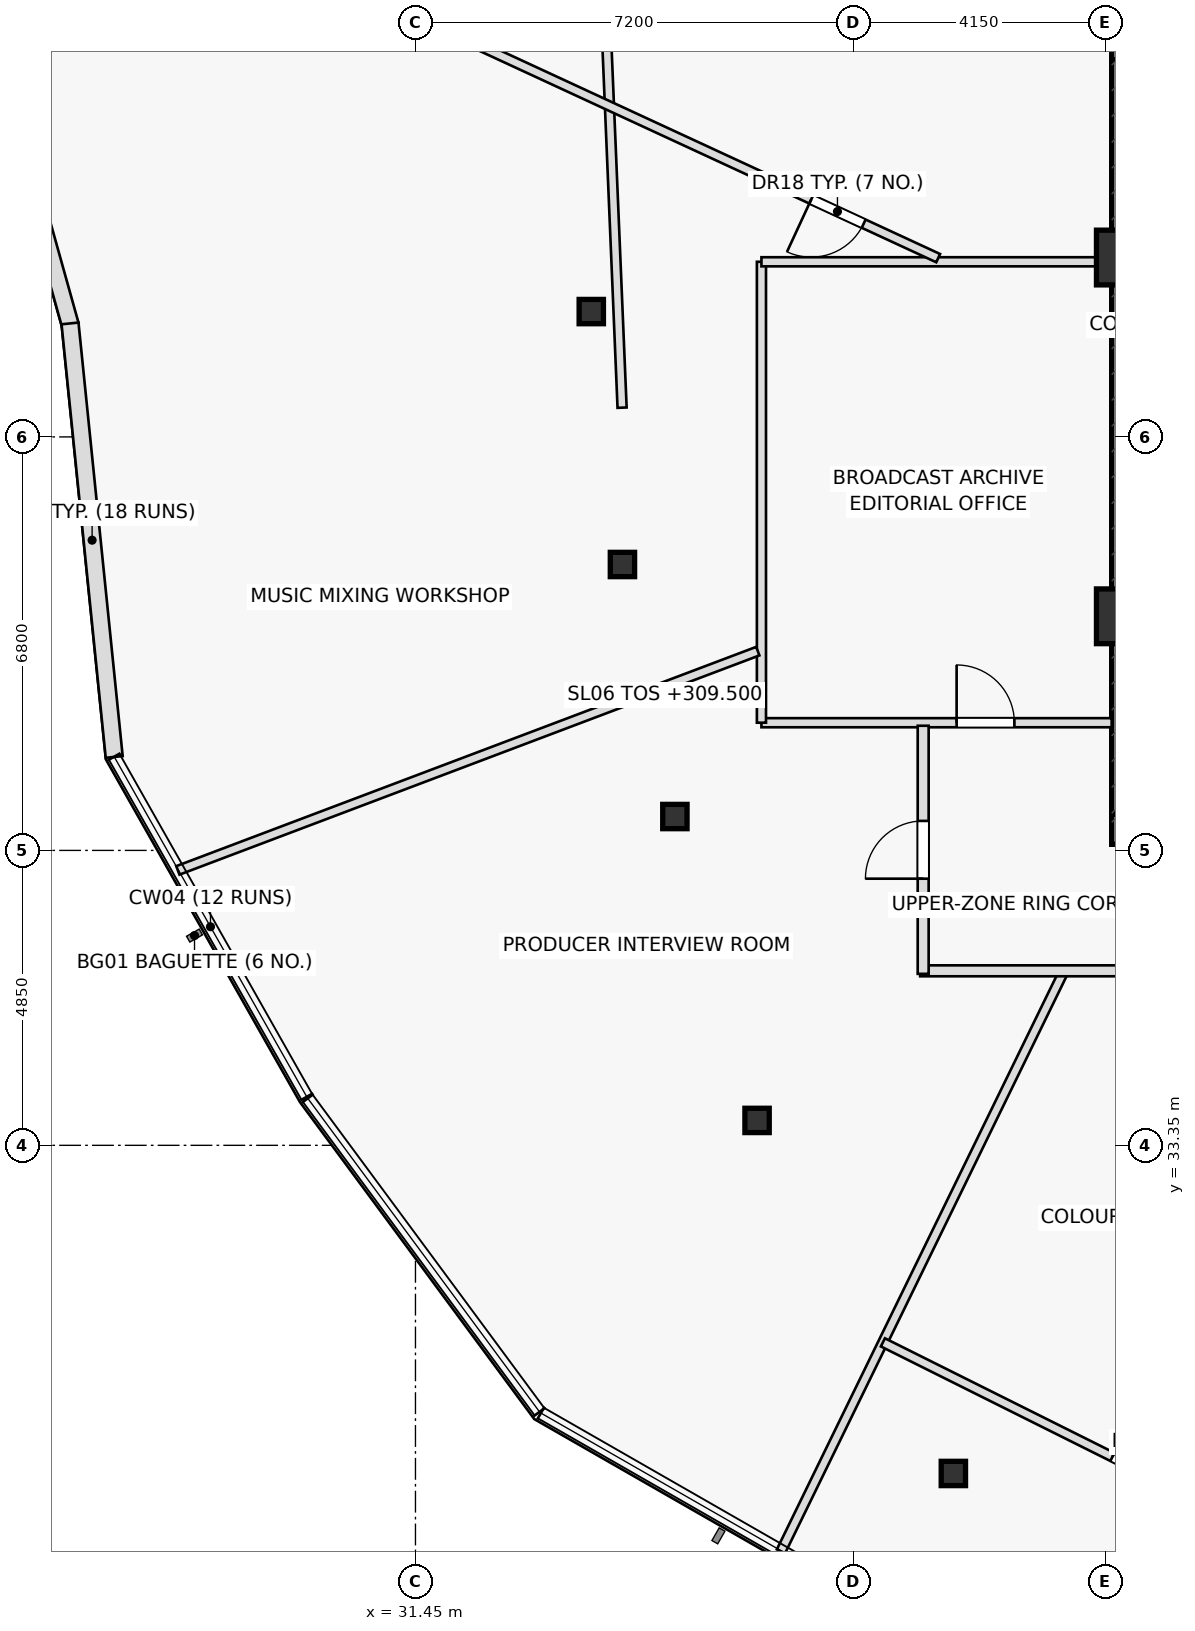
"""IFC4 building model, lengths in metres.
Left out: names, types, materials, properties, quantities, classifications, styles, units other than length and angle.
Written with IfcOpenShell. Run it as: python <this file> out.ifc"""

import sys

from ifc_helpers import new_model, si_unit, direction, frame, frame_2d, origin, origin_2d, place, context, subcontext, project, spatial, rectangle, hollow_rectangle, extrude, element, fill, save


model = new_model("IFC4")
c1 = context("Model", 3, precision=1e-05, world=origin(), true_north=direction((0.0, 1.0)))
c2 = subcontext(c1, "Body", "Model", "MODEL_VIEW")
j1 = project(units=[si_unit("LENGTHUNIT", "METRE"), si_unit("PLANEANGLEUNIT", "RADIAN")], contexts=[c1])
p1 = place(None, origin())
s1 = spatial("IfcSite", under=j1, at=p1, CompositionType="ELEMENT")
p2 = place(p1, origin())
s2 = spatial("IfcBuilding", under=s1, at=p2, CompositionType="ELEMENT")
p3 = place(p2, frame((0.0, 0.0, 309.5)))
s3 = spatial("IfcBuildingStorey", under=s2, at=p3, CompositionType="ELEMENT", Elevation=309.5)
p4 = place(p3, frame((42.9, 51.45, 0.0), z_axis=(0.0, 0.0, 1.0), x_axis=(1.0, 0.0, 0.0)))
e1 = element("IfcWall", 1, at=p4, inside=s3, PredefinedType="SHEAR", context=c2, shape_type="SweptSolid", body=[
    extrude(rectangle(XDim=14.2, YDim=0.5, at=frame_2d((7.1, 0.0))), origin(), (0.0, 0.0, 1.0), 3.7),
])
p5 = place(p4, frame((0.78, 0.0, 0.0)))
e2 = element("IfcOpeningElement", 2, at=p5, cuts=e1, PredefinedType="OPENING", context=c2, shape_type="SweptSolid", body=[
    extrude(rectangle(XDim=1.05, YDim=2.2, at=frame_2d((0.525, 1.1))), frame((0.0, 0.26, 0.0), z_axis=(0.0, -1.0, 0.0), x_axis=(1.0, 0.0, 0.0)), (0.0, 0.0, 1.0), 0.52),
])
p6 = place(p3, frame((42.9, 38.55, 0.0), z_axis=(0.0, 0.0, 1.0), x_axis=(1.0, 0.0, 0.0)))
e3 = element("IfcWall", 3, at=p6, inside=s3, PredefinedType="SHEAR", context=c2, shape_type="SweptSolid", body=[
    extrude(rectangle(XDim=14.2, YDim=0.5, at=frame_2d((7.1, 0.0))), origin(), (0.0, 0.0, 1.0), 3.7),
])
p7 = place(p6, frame((0.78, 0.0, 0.0)))
e4 = element("IfcOpeningElement", 4, at=p7, cuts=e3, PredefinedType="OPENING", context=c2, shape_type="SweptSolid", body=[
    extrude(rectangle(XDim=1.05, YDim=2.2, at=frame_2d((0.525, 1.1))), frame((0.0, 0.26, 0.0), z_axis=(0.0, -1.0, 0.0), x_axis=(1.0, 0.0, 0.0)), (0.0, 0.0, 1.0), 0.52),
])
p8 = place(p3, frame((43.15, 38.8, 0.0), z_axis=(0.0, 0.0, 1.0), x_axis=(0.0, 1.0, 0.0)))
e5 = element("IfcWall", 5, at=p8, inside=s3, PredefinedType="SHEAR", context=c2, shape_type="SweptSolid", body=[
    extrude(rectangle(XDim=12.4, YDim=0.5, at=frame_2d((6.2, 0.0))), origin(), (0.0, 0.0, 1.0), 3.7),
])
for number, where, z_axis, x_axis in (
    (6, (43.1, 47.95, 0.0), (0.0, 0.0, 1.0), (1.0, 0.0, 0.0)),
    (7, (43.1, 42.05, 0.0), (0.0, 0.0, 1.0), (1.0, 0.0, 0.0)),
):
    element("IfcColumn", number, at=place(p3, frame(where, z_axis=z_axis, x_axis=x_axis)), inside=s3, PredefinedType="COLUMN", context=c2, shape_type="SweptSolid", body=[
        extrude(rectangle(XDim=0.9, YDim=0.9, at=origin_2d()), origin(), (0.0, 0.0, 1.0), 3.7),
    ])
for number, where, z_axis, x_axis in (
    (8, (34.342, 47.061, 0.0), (0.0, 0.0, 1.0), (1.0, 0.0, 0.0)),
    (9, (34.854, 42.902, 0.0), (0.0, 0.0, 1.0), (1.0, 0.0, 0.0)),
    (10, (35.717, 38.757, 0.0), (0.0, 0.0, 1.0), (1.0, 0.0, 0.0)),
    (11, (37.068, 33.76, 0.0), (0.0, 0.0, 1.0), (1.0, 0.0, 0.0)),
    (12, (40.296, 27.954, 0.0), (0.0, 0.0, 1.0), (1.0, 0.0, 0.0)),
):
    element("IfcColumn", number, at=place(p3, frame(where, z_axis=z_axis, x_axis=x_axis)), inside=s3, PredefinedType="COLUMN", context=c2, shape_type="SweptSolid", body=[
        extrude(hollow_rectangle(XDim=0.4, YDim=0.4, WallThickness=0.025, at=origin_2d()), origin(), (0.0, 0.0, 1.0), 3.7),
    ])
p9 = place(p3, frame((34.507, 53.613, 0.0), z_axis=(0.0, 0.0, 1.0), x_axis=(0.041875090182, -0.999122853718, 0.0)))
e13 = element("IfcWall", 13, at=p9, inside=s3, PredefinedType="PARTITIONING", context=c2, shape_type="SweptSolid", body=[
    extrude(rectangle(XDim=8.139, YDim=0.15, at=frame_2d((4.069, 0.0))), origin(), (0.0, 0.0, 1.0), 3.275),
])
p10 = place(p3, frame((37.14, 40.3, 0.0), z_axis=(0.0, 0.0, 1.0), x_axis=(1.0, 0.0, 0.0)))
e14 = element("IfcWall", 14, at=p10, inside=s3, PredefinedType="PARTITIONING", context=c2, shape_type="SweptSolid", body=[
    extrude(rectangle(XDim=5.76, YDim=0.15, at=frame_2d((2.88, 0.0))), origin(), (0.0, 0.0, 1.0), 3.225),
])
p11 = place(p10, frame((3.21, 0.0, 0.0)))
e15 = element("IfcOpeningElement", 15, at=p11, cuts=e14, PredefinedType="OPENING", context=c2, shape_type="SweptSolid", body=[
    extrude(rectangle(XDim=0.95, YDim=2.05, at=frame_2d((0.475, 1.025))), frame((0.0, 0.085, 0.0), z_axis=(0.0, -1.0, 0.0), x_axis=(1.0, 0.0, 0.0)), (0.0, 0.0, 1.0), 0.17),
])
p12 = place(p3, frame((37.14, 40.3, 0.0), z_axis=(0.0, 0.0, 1.0), x_axis=(0.0, 1.0, 0.0)))
e16 = element("IfcWall", 16, at=p12, inside=s3, PredefinedType="PARTITIONING", context=c2, shape_type="SweptSolid", body=[
    extrude(rectangle(XDim=7.58, YDim=0.15, at=frame_2d((3.79, 0.0))), origin(), (0.0, 0.0, 1.0), 3.7),
])
p13 = place(p3, frame((37.14, 47.88, 0.0), z_axis=(0.0, 0.0, 1.0), x_axis=(1.0, 0.0, 0.0)))
e17 = element("IfcWall", 17, at=p13, inside=s3, PredefinedType="PARTITIONING", context=c2, shape_type="SweptSolid", body=[
    extrude(rectangle(XDim=5.76, YDim=0.15, at=frame_2d((2.88, 0.0))), origin(), (0.0, 0.0, 1.0), 3.7),
])
p14 = place(p3, frame((42.118, 36.22, 0.0), z_axis=(0.0, 0.0, 1.0), x_axis=(-0.438366122434, -0.898796496823, 0.0)))
e18 = element("IfcWall", 18, at=p14, inside=s3, PredefinedType="PARTITIONING", context=c2, shape_type="SweptSolid", body=[
    extrude(rectangle(XDim=10.622, YDim=0.15, at=frame_2d((5.311, 0.0))), origin(), (0.0, 0.0, 1.0), 3.275),
])
p15 = place(p3, frame((40.046, 47.94, 0.0), z_axis=(0.0, 0.0, 1.0), x_axis=(-0.907540405204, 0.419964775811, 0.0)))
e19 = element("IfcWall", 19, at=p15, inside=s3, PredefinedType="PARTITIONING", context=c2, shape_type="SweptSolid", body=[
    extrude(rectangle(XDim=17.773, YDim=0.15, at=frame_2d((8.887, 0.0))), origin(), (0.0, 0.0, 1.0), 3.225),
])
p16 = place(p15, frame((1.35, 0.0, 0.0)))
e20 = element("IfcOpeningElement", 20, at=p16, cuts=e19, PredefinedType="OPENING", context=c2, shape_type="SweptSolid", body=[
    extrude(rectangle(XDim=0.95, YDim=2.05, at=frame_2d((0.475, 1.025))), frame((0.0, 0.085, 0.0), z_axis=(0.0, -1.0, 0.0), x_axis=(1.0, 0.0, 0.0)), (0.0, 0.0, 1.0), 0.17),
])
p17 = place(p3, frame((37.08, 41.477, 0.0), z_axis=(0.0, 0.0, 1.0), x_axis=(-0.935398018186, -0.353596588747, 0.0)))
e21 = element("IfcWall", 21, at=p17, inside=s3, PredefinedType="PARTITIONING", context=c2, shape_type="SweptSolid", body=[
    extrude(rectangle(XDim=10.197, YDim=0.15, at=frame_2d((5.098, 0.0))), origin(), (0.0, 0.0, 1.0), 3.275),
])
p18 = place(p3, frame((39.137, 30.11, 0.0), z_axis=(0.0, 0.0, 1.0), x_axis=(0.894770249546, -0.446526819493, 0.0)))
e22 = element("IfcWall", 22, at=p18, inside=s3, PredefinedType="PARTITIONING", context=c2, shape_type="SweptSolid", body=[
    extrude(rectangle(XDim=9.387, YDim=0.15, at=frame_2d((4.693, 0.0))), origin(), (0.0, 0.0, 1.0), 3.7),
])
p19 = place(p18, frame((4.218, 0.0, 0.0)))
e23 = element("IfcOpeningElement", 23, at=p19, cuts=e22, PredefinedType="OPENING", context=c2, shape_type="SweptSolid", body=[
    extrude(rectangle(XDim=0.95, YDim=2.05, at=frame_2d((0.475, 1.025))), frame((0.0, 0.085, 0.0), z_axis=(0.0, -1.0, 0.0), x_axis=(1.0, 0.0, 0.0)), (0.0, 0.0, 1.0), 0.17),
])
p20 = place(p3, frame((59.23, 36.22, 0.0), z_axis=(0.0, 0.0, 1.0), x_axis=(-1.0, 0.0, 0.0)))
e24 = element("IfcWall", 24, at=p20, inside=s3, PredefinedType="PARTITIONING", context=c2, shape_type="SweptSolid", body=[
    extrude(rectangle(XDim=19.48, YDim=0.18, at=frame_2d((9.74, 0.0))), origin(), (0.0, 0.0, 1.0), 3.225),
])
p21 = place(p20, frame((5.793, 0.0, 0.0)))
e25 = element("IfcOpeningElement", 25, at=p21, cuts=e24, PredefinedType="OPENING", context=c2, shape_type="SweptSolid", body=[
    extrude(rectangle(XDim=0.95, YDim=2.05, at=frame_2d((0.475, 1.025))), frame((0.0, 0.1, 0.0), z_axis=(0.0, -1.0, 0.0), x_axis=(1.0, 0.0, 0.0)), (0.0, 0.0, 1.0), 0.2),
])
p22 = place(p20, frame((14.253, 0.0, 0.0)))
e26 = element("IfcOpeningElement", 26, at=p22, cuts=e24, PredefinedType="OPENING", context=c2, shape_type="SweptSolid", body=[
    extrude(rectangle(XDim=0.95, YDim=2.05, at=frame_2d((0.475, 1.025))), frame((0.0, 0.1, 0.0), z_axis=(0.0, -1.0, 0.0), x_axis=(1.0, 0.0, 0.0)), (0.0, 0.0, 1.0), 0.2),
])
p23 = place(p3, frame((39.8, 36.17, 0.0), z_axis=(0.0, 0.0, 1.0), x_axis=(0.0, 1.0, 0.0)))
e27 = element("IfcWall", 27, at=p23, inside=s3, PredefinedType="PARTITIONING", context=c2, shape_type="SweptSolid", body=[
    extrude(rectangle(XDim=4.08, YDim=0.18, at=frame_2d((2.04, 0.0))), origin(), (0.0, 0.0, 1.0), 3.475),
])
p24 = place(p23, frame((1.565, 0.0, 0.0)))
e28 = element("IfcOpeningElement", 28, at=p24, cuts=e27, PredefinedType="OPENING", context=c2, shape_type="SweptSolid", body=[
    extrude(rectangle(XDim=0.95, YDim=2.05, at=frame_2d((0.475, 1.025))), frame((0.0, 0.1, 0.0), z_axis=(0.0, -1.0, 0.0), x_axis=(1.0, 0.0, 0.0)), (0.0, 0.0, 1.0), 0.2),
])
p25 = place(p3, frame((24.02, 53.111, 0.0), z_axis=(0.0, 0.0, 1.0), x_axis=(0.269292137554, -0.963058536461, 0.0)))
e29 = element("IfcWall", 29, at=p25, inside=s3, PredefinedType="STANDARD", context=c2, shape_type="SweptSolid", body=[
    extrude(rectangle(XDim=6.515, YDim=0.28, at=frame_2d((3.257, 0.0))), origin(), (0.0, 0.0, 1.0), 3.7),
])
p26 = place(p3, frame((25.769, 46.866, 0.0), z_axis=(0.0, 0.0, 1.0), x_axis=(0.101422856147, -0.994843406899, 0.0)))
e30 = element("IfcWall", 30, at=p26, inside=s3, PredefinedType="STANDARD", context=c2, shape_type="SweptSolid", body=[
    extrude(rectangle(XDim=7.166, YDim=0.28, at=frame_2d((3.583, 0.0))), origin(), (0.0, 0.0, 1.0), 3.7),
])
p27 = place(p11, origin())
e31 = element("IfcDoor", 31, at=p27, inside=s3, OperationType="SINGLE_SWING_LEFT", PredefinedType="DOOR", context=c2, shape_type="SweptSolid", body=[
    extrude(rectangle(XDim=0.95, YDim=2.05, at=frame_2d((0.475, 1.025))), frame((0.0, 0.025, 0.0), z_axis=(0.0, -1.0, 0.0), x_axis=(1.0, 0.0, 0.0)), (0.0, 0.0, 1.0), 0.05),
])
fill(e15, e31)
p28 = place(p16, origin())
e32 = element("IfcDoor", 32, at=p28, inside=s3, OperationType="SINGLE_SWING_RIGHT", PredefinedType="DOOR", context=c2, shape_type="SweptSolid", body=[
    extrude(rectangle(XDim=0.95, YDim=2.05, at=frame_2d((0.475, 1.025))), frame((0.0, 0.025, 0.0), z_axis=(0.0, -1.0, 0.0), x_axis=(1.0, 0.0, 0.0)), (0.0, 0.0, 1.0), 0.05),
])
fill(e20, e32)
p29 = place(p19, origin())
e33 = element("IfcDoor", 33, at=p29, inside=s3, OperationType="SINGLE_SWING_LEFT", PredefinedType="DOOR", context=c2, shape_type="SweptSolid", body=[
    extrude(rectangle(XDim=0.95, YDim=2.05, at=frame_2d((0.475, 1.025))), frame((0.0, 0.025, 0.0), z_axis=(0.0, -1.0, 0.0), x_axis=(1.0, 0.0, 0.0)), (0.0, 0.0, 1.0), 0.05),
])
fill(e23, e33)
p30 = place(p24, origin())
e34 = element("IfcDoor", 34, at=p30, inside=s3, OperationType="SINGLE_SWING_LEFT", PredefinedType="DOOR", context=c2, shape_type="SweptSolid", body=[
    extrude(rectangle(XDim=0.95, YDim=2.05, at=frame_2d((0.475, 1.025))), frame((0.0, 0.025, 0.0), z_axis=(0.0, -1.0, 0.0), x_axis=(1.0, 0.0, 0.0)), (0.0, 0.0, 1.0), 0.05),
])
fill(e28, e34)
save(model, sys.argv[1])
